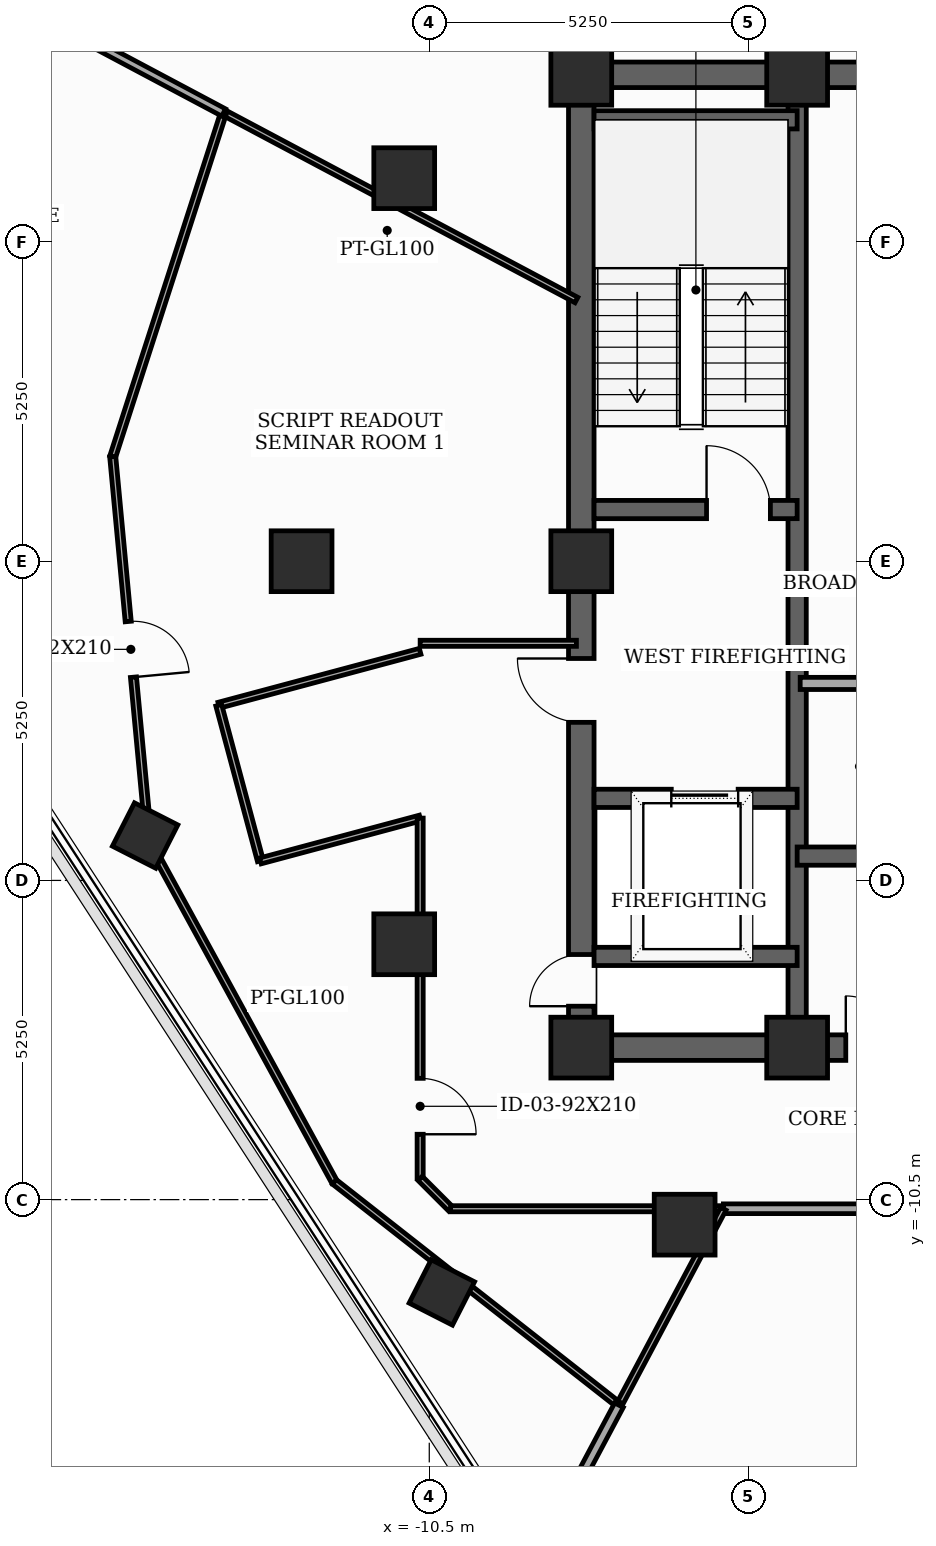
"""IFC4 building model, lengths in metres.
Left out: names, types, materials, properties, quantities, classifications, styles, units other than length and angle.
Written with IfcOpenShell. Run it as: python <this file> out.ifc"""

import sys

from ifc_helpers import new_model, si_unit, direction, frame, frame_2d, origin, origin_2d, place, context, subcontext, project, spatial, rectangle, extrude, element, fill, save


model = new_model("IFC4")
c1 = context("Model", 3, precision=1e-05, world=origin(), true_north=direction((0.0, 1.0)))
c2 = subcontext(c1, "Body", "Model", "MODEL_VIEW")
j1 = project(units=[si_unit("LENGTHUNIT", "METRE"), si_unit("PLANEANGLEUNIT", "RADIAN")], contexts=[c1])
p1 = place(None, origin())
s1 = spatial("IfcSite", under=j1, at=p1, CompositionType="ELEMENT")
p2 = place(p1, origin())
s2 = spatial("IfcBuilding", under=s1, at=p2, CompositionType="ELEMENT")
p3 = place(p2, frame((0.0, 0.0, 270.7)))
s3 = spatial("IfcBuildingStorey", under=s2, at=p3, CompositionType="ELEMENT", Elevation=270.7)
for number, where, z_axis, x_axis in (
    (1, (-8.0, -8.0, 0.0), (0.0, 0.0, 1.0), (1.0, 0.0, 0.0)),
    (2, (-4.45, -8.0, 0.0), (0.0, 0.0, 1.0), (1.0, 0.0, 0.0)),
    (3, (-4.45, 8.0, 0.0), (0.0, 0.0, 1.0), (1.0, 0.0, 0.0)),
    (4, (-8.0, 8.0, 0.0), (0.0, 0.0, 1.0), (1.0, 0.0, 0.0)),
    (5, (-8.0, 0.0, 0.0), (0.0, 0.0, 1.0), (1.0, 0.0, 0.0)),
    (6, (-10.912, 6.3, 0.0), (0.0, 0.0, 1.0), (1.0, 0.0, 0.0)),
    (7, (-12.6, 0.0, 0.0), (0.0, 0.0, 1.0), (1.0, 0.0, 0.0)),
    (8, (-10.912, -6.3, 0.0), (0.0, 0.0, 1.0), (1.0, 0.0, 0.0)),
    (9, (-6.3, -10.912, 0.0), (0.0, 0.0, 1.0), (1.0, 0.0, 0.0)),
):
    element("IfcColumn", number, at=place(p3, frame(where, z_axis=z_axis, x_axis=x_axis)), inside=s3, PredefinedType="COLUMN", context=c2, shape_type="SweptSolid", body=[
        extrude(rectangle(XDim=1.0, YDim=1.0, at=origin_2d()), origin(), (0.0, 0.0, 1.0), 3.7),
    ])
for number, where, z_axis, x_axis in (
    (10, (-15.173, -4.512, 0.0), (0.0, 0.0, 1.0), (0.454, 0.891, 0.0)),
    (11, (-10.293, -12.026, 0.0), (0.0, 0.0, 1.0), (0.454, 0.891, 0.0)),
):
    element("IfcColumn", number, at=place(p3, frame(where, z_axis=z_axis, x_axis=x_axis)), inside=s3, PredefinedType="COLUMN", context=c2, shape_type="SweptSolid", body=[
        extrude(rectangle(XDim=0.8, YDim=0.8, at=origin_2d()), origin(), (0.0, 0.0, 1.0), 3.7),
    ])
p4 = place(p3, frame((-8.0, -8.0, 0.0), z_axis=(0.0, 0.0, 1.0), x_axis=(0.0, 1.0, 0.0)))
e12 = element("IfcWall", 12, at=p4, inside=s3, PredefinedType="SHEAR", context=c2, shape_type="SweptSolid", body=[
    extrude(rectangle(XDim=16.0, YDim=0.42, at=frame_2d((8.0, 0.0))), origin(), (0.0, 0.0, 1.0), 3.5),
])
p5 = place(p4, frame((0.681, 0.0, 0.0)))
e13 = element("IfcOpeningElement", 13, at=p5, cuts=e12, PredefinedType="OPENING", context=c2, shape_type="SweptSolid", body=[
    extrude(rectangle(XDim=0.85, YDim=2.02, at=frame_2d((0.425, 1.01))), frame((0.0, 0.22, 0.0), z_axis=(0.0, -1.0, 0.0), x_axis=(1.0, 0.0, 0.0)), (0.0, 0.0, 1.0), 0.44),
])
p6 = place(p4, frame((5.35, 0.0, 0.0)))
e14 = element("IfcOpeningElement", 14, at=p6, cuts=e12, PredefinedType="OPENING", context=c2, shape_type="SweptSolid", body=[
    extrude(rectangle(XDim=1.05, YDim=2.15, at=frame_2d((0.525, 1.075))), frame((0.0, 0.22, 0.0), z_axis=(0.0, -1.0, 0.0), x_axis=(1.0, 0.0, 0.0)), (0.0, 0.0, 1.0), 0.44),
])
p7 = place(p3, frame((-8.0, -8.0, 0.0), z_axis=(0.0, 0.0, 1.0), x_axis=(1.0, 0.0, 0.0)))
e15 = element("IfcWall", 15, at=p7, inside=s3, PredefinedType="SHEAR", context=c2, shape_type="SweptSolid", body=[
    extrude(rectangle(XDim=16.0, YDim=0.42, at=frame_2d((8.0, 0.0))), origin(), (0.0, 0.0, 1.0), 3.5),
])
p8 = place(p7, frame((4.35, 0.0, 0.0)))
e16 = element("IfcOpeningElement", 16, at=p8, cuts=e15, PredefinedType="OPENING", context=c2, shape_type="SweptSolid", body=[
    extrude(rectangle(XDim=0.85, YDim=2.02, at=frame_2d((0.425, 1.01))), frame((0.0, 0.22, 0.0), z_axis=(0.0, -1.0, 0.0), x_axis=(1.0, 0.0, 0.0)), (0.0, 0.0, 1.0), 0.44),
])
p9 = place(p7, frame((6.49, 0.0, 0.0)))
e17 = element("IfcOpeningElement", 17, at=p9, cuts=e15, PredefinedType="OPENING", context=c2, shape_type="SweptSolid", body=[
    extrude(rectangle(XDim=0.85, YDim=2.02, at=frame_2d((0.425, 1.01))), frame((0.0, 0.22, 0.0), z_axis=(0.0, -1.0, 0.0), x_axis=(1.0, 0.0, 0.0)), (0.0, 0.0, 1.0), 0.44),
])
p10 = place(p7, frame((8.69, 0.0, 0.0)))
e18 = element("IfcOpeningElement", 18, at=p10, cuts=e15, PredefinedType="OPENING", context=c2, shape_type="SweptSolid", body=[
    extrude(rectangle(XDim=0.85, YDim=2.02, at=frame_2d((0.425, 1.01))), frame((0.0, 0.22, 0.0), z_axis=(0.0, -1.0, 0.0), x_axis=(1.0, 0.0, 0.0)), (0.0, 0.0, 1.0), 0.44),
])
p11 = place(p7, frame((10.8, 0.0, 0.0)))
e19 = element("IfcOpeningElement", 19, at=p11, cuts=e15, PredefinedType="OPENING", context=c2, shape_type="SweptSolid", body=[
    extrude(rectangle(XDim=0.85, YDim=2.02, at=frame_2d((0.425, 1.01))), frame((0.0, 0.22, 0.0), z_axis=(0.0, -1.0, 0.0), x_axis=(1.0, 0.0, 0.0)), (0.0, 0.0, 1.0), 0.44),
])
p12 = place(p3, frame((-8.0, 8.0, 0.0), z_axis=(0.0, 0.0, 1.0), x_axis=(1.0, 0.0, 0.0)))
e20 = element("IfcWall", 20, at=p12, inside=s3, PredefinedType="SHEAR", context=c2, shape_type="SweptSolid", body=[
    extrude(rectangle(XDim=16.0, YDim=0.42, at=frame_2d((8.0, 0.0))), origin(), (0.0, 0.0, 1.0), 3.5),
])
p13 = place(p12, frame((7.1, 0.0, 0.0)))
e21 = element("IfcOpeningElement", 21, at=p13, cuts=e20, PredefinedType="OPENING", context=c2, shape_type="SweptSolid", body=[
    extrude(rectangle(XDim=1.8, YDim=2.15, at=frame_2d((0.9, 1.075))), frame((0.0, 0.22, 0.0), z_axis=(0.0, -1.0, 0.0), x_axis=(1.0, 0.0, 0.0)), (0.0, 0.0, 1.0), 0.44),
])
p14 = place(p3, frame((-4.45, -7.79, 0.0), z_axis=(0.0, 0.0, 1.0), x_axis=(0.0, 1.0, 0.0)))
e22 = element("IfcWall", 22, at=p14, inside=s3, PredefinedType="SHEAR", context=c2, shape_type="SweptSolid", body=[
    extrude(rectangle(XDim=15.58, YDim=0.3, at=frame_2d((7.79, 0.0))), origin(), (0.0, 0.0, 1.0), 3.5),
])
p15 = place(p3, frame((-7.79, 0.85, 0.0), z_axis=(0.0, 0.0, 1.0), x_axis=(1.0, 0.0, 0.0)))
e23 = element("IfcWall", 23, at=p15, inside=s3, PredefinedType="SHEAR", context=c2, shape_type="SweptSolid", body=[
    extrude(rectangle(XDim=3.34, YDim=0.3, at=frame_2d((1.67, 0.0))), origin(), (0.0, 0.0, 1.0), 3.5),
])
p16 = place(p15, frame((1.85, 0.0, 0.0)))
e24 = element("IfcOpeningElement", 24, at=p16, cuts=e23, PredefinedType="OPENING", context=c2, shape_type="SweptSolid", body=[
    extrude(rectangle(XDim=1.05, YDim=2.15, at=frame_2d((0.525, 1.075))), frame((0.0, 0.16, 0.0), z_axis=(0.0, -1.0, 0.0), x_axis=(1.0, 0.0, 0.0)), (0.0, 0.0, 1.0), 0.32),
])
p17 = place(p3, frame((-7.79, 7.26, 0.0), z_axis=(0.0, 0.0, 1.0), x_axis=(1.0, 0.0, 0.0)))
e25 = element("IfcWall", 25, at=p17, inside=s3, PredefinedType="SHEAR", context=c2, shape_type="SweptSolid", body=[
    extrude(rectangle(XDim=3.34, YDim=0.3, at=frame_2d((1.67, 0.0))), origin(), (0.0, 0.0, 1.0), 3.5),
])
p18 = place(p3, frame((-7.79, -3.9, 0.0), z_axis=(0.0, 0.0, 1.0), x_axis=(1.0, 0.0, 0.0)))
e26 = element("IfcWall", 26, at=p18, inside=s3, PredefinedType="SHEAR", context=c2, shape_type="SweptSolid", body=[
    extrude(rectangle(XDim=3.34, YDim=0.3, at=frame_2d((1.67, 0.0))), origin(), (0.0, 0.0, 1.0), 3.5),
])
p19 = place(p18, frame((1.27, 0.0, 0.0)))
e27 = element("IfcOpeningElement", 27, at=p19, cuts=e26, PredefinedType="OPENING", context=c2, shape_type="SweptSolid", body=[
    extrude(rectangle(XDim=1.1, YDim=2.1, at=frame_2d((0.55, 1.05))), frame((0.0, 0.16, 0.0), z_axis=(0.0, -1.0, 0.0), x_axis=(1.0, 0.0, 0.0)), (0.0, 0.0, 1.0), 0.32),
])
p20 = place(p3, frame((-7.79, -6.5, 0.0), z_axis=(0.0, 0.0, 1.0), x_axis=(1.0, 0.0, 0.0)))
e28 = element("IfcWall", 28, at=p20, inside=s3, PredefinedType="SHEAR", context=c2, shape_type="SweptSolid", body=[
    extrude(rectangle(XDim=3.34, YDim=0.3, at=frame_2d((1.67, 0.0))), origin(), (0.0, 0.0, 1.0), 3.5),
])
p21 = place(p3, frame((-4.45, -4.85, 0.0), z_axis=(0.0, 0.0, 1.0), x_axis=(1.0, 0.0, 0.0)))
e29 = element("IfcWall", 29, at=p21, inside=s3, PredefinedType="SHEAR", context=c2, shape_type="SweptSolid", body=[
    extrude(rectangle(XDim=8.9, YDim=0.3, at=frame_2d((4.45, 0.0))), origin(), (0.0, 0.0, 1.0), 3.5),
])
p22 = place(p3, frame((-4.4, -2.01, 0.0), z_axis=(0.0, 0.0, 1.0), x_axis=(1.0, 0.0, 0.0)))
e30 = element("IfcWall", 30, at=p22, inside=s3, PredefinedType="SOLIDWALL", context=c2, shape_type="SweptSolid", body=[
    extrude(rectangle(XDim=2.68, YDim=0.2, at=frame_2d((1.34, 0.0))), origin(), (0.0, 0.0, 1.0), 3.5),
])
p23 = place(p3, frame((-8.08, -1.35, 0.0), z_axis=(0.0, 0.0, 1.0), x_axis=(-1.0, 0.0, 0.0)))
e31 = element("IfcWall", 31, at=p23, inside=s3, PredefinedType="MOVABLE", context=c2, shape_type="SweptSolid", body=[
    extrude(rectangle(XDim=2.57, YDim=0.1, at=frame_2d((1.285, 0.0))), origin(), (0.0, 0.0, 1.0), 2.885),
])
p24 = place(p3, frame((-10.65, -1.482, 0.0), z_axis=(0.0, 0.0, 1.0), x_axis=(-0.965961397105, -0.2586862565, 0.0)))
e32 = element("IfcWall", 32, at=p24, inside=s3, PredefinedType="MOVABLE", context=c2, shape_type="SweptSolid", body=[
    extrude(rectangle(XDim=3.429, YDim=0.1, at=frame_2d((1.714, 0.0))), origin(), (0.0, 0.0, 1.0), 2.885),
])
p25 = place(p3, frame((-13.962, -2.369, 0.0), z_axis=(0.0, 0.0, 1.0), x_axis=(0.258413725385, -0.966034340245, 0.0)))
e33 = element("IfcWall", 33, at=p25, inside=s3, PredefinedType="MOVABLE", context=c2, shape_type="SweptSolid", body=[
    extrude(rectangle(XDim=2.65, YDim=0.1, at=frame_2d((1.325, 0.0))), origin(), (0.0, 0.0, 1.0), 3.5),
])
p26 = place(p3, frame((-13.277, -4.929, 0.0), z_axis=(0.0, 0.0, 1.0), x_axis=(0.965934830229, 0.258785439601, 0.0)))
e34 = element("IfcWall", 34, at=p26, inside=s3, PredefinedType="MOVABLE", context=c2, shape_type="SweptSolid", body=[
    extrude(rectangle(XDim=2.72, YDim=0.1, at=frame_2d((1.36, 0.0))), origin(), (0.0, 0.0, 1.0), 2.885),
])
p27 = place(p3, frame((-10.65, -4.225, 0.0), z_axis=(0.0, 0.0, 1.0), x_axis=(0.0, -1.0, 0.0)))
e35 = element("IfcWall", 35, at=p27, inside=s3, PredefinedType="MOVABLE", context=c2, shape_type="SweptSolid", body=[
    extrude(rectangle(XDim=5.925, YDim=0.1, at=frame_2d((2.962, 0.0))), origin(), (0.0, 0.0, 1.0), 2.885),
])
p28 = place(p27, frame((4.28, 0.0, 0.0)))
e36 = element("IfcOpeningElement", 36, at=p28, cuts=e35, PredefinedType="OPENING", context=c2, shape_type="SweptSolid", body=[
    extrude(rectangle(XDim=0.92, YDim=2.1, at=frame_2d((0.46, 1.05))), frame((0.0, 0.06, 0.0), z_axis=(0.0, -1.0, 0.0), x_axis=(1.0, 0.0, 0.0)), (0.0, 0.0, 1.0), 0.12),
])
p29 = place(p3, frame((-10.65, -10.15, 0.0), z_axis=(0.0, 0.0, 1.0), x_axis=(0.707106781187, -0.707106781187, 0.0)))
e37 = element("IfcWall", 37, at=p29, inside=s3, PredefinedType="MOVABLE", context=c2, shape_type="SweptSolid", body=[
    extrude(rectangle(XDim=0.707, YDim=0.1, at=frame_2d((0.354, 0.0))), origin(), (0.0, 0.0, 1.0), 3.5),
])
p30 = place(p3, frame((-10.15, -10.65, 0.0), z_axis=(0.0, 0.0, 1.0), x_axis=(1.0, 0.0, 0.0)))
e38 = element("IfcWall", 38, at=p30, inside=s3, PredefinedType="MOVABLE", context=c2, shape_type="SweptSolid", body=[
    extrude(rectangle(XDim=4.487, YDim=0.1, at=frame_2d((2.243, 0.0))), origin(), (0.0, 0.0, 1.0), 2.885),
])
p31 = place(p3, frame((-5.663, -10.65, 0.0), z_axis=(0.0, 0.0, 1.0), x_axis=(1.0, 0.0, 0.0)))
e39 = element("IfcWall", 39, at=p31, inside=s3, PredefinedType="PARTITIONING", context=c2, shape_type="SweptSolid", body=[
    extrude(rectangle(XDim=7.541, YDim=0.16, at=frame_2d((3.771, 0.0))), origin(), (0.0, 0.0, 1.0), 2.885),
])
p32 = place(p31, frame((3.271, 0.0, 0.0)))
e40 = element("IfcOpeningElement", 40, at=p32, cuts=e39, PredefinedType="OPENING", context=c2, shape_type="SweptSolid", body=[
    extrude(rectangle(XDim=1.0, YDim=2.15, at=frame_2d((0.5, 1.075))), frame((0.0, 0.09, 0.0), z_axis=(0.0, -1.0, 0.0), x_axis=(1.0, 0.0, 0.0)), (0.0, 0.0, 1.0), 0.18),
])
p33 = place(p3, frame((-7.38, -13.881, 0.0), z_axis=(0.0, 0.0, 1.0), x_axis=(0.469202384294, 0.883090664979, 0.0)))
e41 = element("IfcWall", 41, at=p33, inside=s3, PredefinedType="MOVABLE", context=c2, shape_type="SweptSolid", body=[
    extrude(rectangle(XDim=3.659, YDim=0.1, at=frame_2d((1.83, 0.0))), origin(), (0.0, 0.0, 1.0), 2.885),
])
p34 = place(p3, frame((-8.08, 4.296, 0.0), z_axis=(0.0, 0.0, 1.0), x_axis=(-0.882977594756, 0.469415133074, 0.0)))
e42 = element("IfcWall", 42, at=p34, inside=s3, PredefinedType="MOVABLE", context=c2, shape_type="SweptSolid", body=[
    extrude(rectangle(XDim=6.57, YDim=0.1, at=frame_2d((3.285, 0.0))), origin(), (0.0, 0.0, 1.0), 2.885),
])
p35 = place(p3, frame((-13.881, 7.38, 0.0), z_axis=(0.0, 0.0, 1.0), x_axis=(-0.306876830036, -0.951749237555, 0.0)))
e43 = element("IfcWall", 43, at=p35, inside=s3, PredefinedType="MOVABLE", context=c2, shape_type="SweptSolid", body=[
    extrude(rectangle(XDim=5.947, YDim=0.1, at=frame_2d((2.973, 0.0))), origin(), (0.0, 0.0, 1.0), 3.185),
])
p36 = place(p3, frame((-15.706, 1.72, 0.0), z_axis=(0.0, 0.0, 1.0), x_axis=(0.093602035829, -0.995609692042, 0.0)))
e44 = element("IfcWall", 44, at=p36, inside=s3, PredefinedType="MOVABLE", context=c2, shape_type="SweptSolid", body=[
    extrude(rectangle(XDim=6.367, YDim=0.1, at=frame_2d((3.183, 0.0))), origin(), (0.0, 0.0, 1.0), 3.035),
])
p37 = place(p36, frame((2.723, 0.0, 0.0)))
e45 = element("IfcOpeningElement", 45, at=p37, cuts=e44, PredefinedType="OPENING", context=c2, shape_type="SweptSolid", body=[
    extrude(rectangle(XDim=0.92, YDim=2.1, at=frame_2d((0.46, 1.05))), frame((0.0, 0.06, 0.0), z_axis=(0.0, -1.0, 0.0), x_axis=(1.0, 0.0, 0.0)), (0.0, 0.0, 1.0), 0.12),
])
p38 = place(p3, frame((-15.11, -4.619, 0.0), z_axis=(0.0, 0.0, 1.0), x_axis=(0.47908041906, -0.877771013461, 0.0)))
e46 = element("IfcWall", 46, at=p38, inside=s3, PredefinedType="MOVABLE", context=c2, shape_type="SweptSolid", body=[
    extrude(rectangle(XDim=6.368, YDim=0.1, at=frame_2d((3.184, 0.0))), origin(), (0.0, 0.0, 1.0), 3.035),
])
p39 = place(p3, frame((-12.059, -10.209, 0.0), z_axis=(0.0, 0.0, 1.0), x_axis=(0.786677127243, -0.617364638989, 0.0)))
e47 = element("IfcWall", 47, at=p39, inside=s3, PredefinedType="MOVABLE", context=c2, shape_type="SweptSolid", body=[
    extrude(rectangle(XDim=5.948, YDim=0.1, at=frame_2d((2.974, 0.0))), origin(), (0.0, 0.0, 1.0), 3.035),
])
p40 = place(p3, frame((-7.38, -13.881, 0.0), z_axis=(0.0, 0.0, 1.0), x_axis=(-0.469646984778, -0.882854296976, 0.0)))
e48 = element("IfcWall", 48, at=p40, inside=s3, PredefinedType="PARTITIONING", context=c2, shape_type="SweptSolid", body=[
    extrude(rectangle(XDim=2.976, YDim=0.16, at=frame_2d((1.488, 0.0))), origin(), (0.0, 0.0, 1.0), 3.035),
])
p41 = place(p3, frame((-25.738, 13.685, 0.0), z_axis=(0.0, 0.0, 1.0), x_axis=(0.882921457353, -0.469520713222, 0.0)))
e49 = element("IfcWall", 49, at=p41, inside=s3, PredefinedType="PARTITIONING", context=c2, shape_type="SweptSolid", body=[
    extrude(rectangle(XDim=13.429, YDim=0.135, at=frame_2d((6.715, 0.0))), origin(), (0.0, 0.0, 1.0), 3.035),
])
p42 = place(p5, origin())
e50 = element("IfcDoor", 50, at=p42, inside=s3, OperationType="SINGLE_SWING_LEFT", PredefinedType="TRAPDOOR", context=c2, shape_type="SweptSolid", body=[
    extrude(rectangle(XDim=0.85, YDim=2.02, at=frame_2d((0.425, 1.01))), frame((0.0, 0.025, 0.0), z_axis=(0.0, -1.0, 0.0), x_axis=(1.0, 0.0, 0.0)), (0.0, 0.0, 1.0), 0.05),
])
fill(e13, e50)
p43 = place(p6, origin())
e51 = element("IfcDoor", 51, at=p43, inside=s3, OperationType="SINGLE_SWING_RIGHT", PredefinedType="DOOR", context=c2, shape_type="SweptSolid", body=[
    extrude(rectangle(XDim=1.05, YDim=2.15, at=frame_2d((0.525, 1.075))), frame((0.0, 0.025, 0.0), z_axis=(0.0, -1.0, 0.0), x_axis=(1.0, 0.0, 0.0)), (0.0, 0.0, 1.0), 0.05),
])
fill(e14, e51)
p44 = place(p8, origin())
e52 = element("IfcDoor", 52, at=p44, inside=s3, OperationType="SINGLE_SWING_LEFT", PredefinedType="TRAPDOOR", context=c2, shape_type="SweptSolid", body=[
    extrude(rectangle(XDim=0.85, YDim=2.02, at=frame_2d((0.425, 1.01))), frame((0.0, 0.025, 0.0), z_axis=(0.0, -1.0, 0.0), x_axis=(1.0, 0.0, 0.0)), (0.0, 0.0, 1.0), 0.05),
])
fill(e16, e52)
p45 = place(p16, origin())
e53 = element("IfcDoor", 53, at=p45, inside=s3, OperationType="SINGLE_SWING_LEFT", PredefinedType="DOOR", context=c2, shape_type="SweptSolid", body=[
    extrude(rectangle(XDim=1.05, YDim=2.15, at=frame_2d((0.525, 1.075))), frame((0.0, 0.025, 0.0), z_axis=(0.0, -1.0, 0.0), x_axis=(1.0, 0.0, 0.0)), (0.0, 0.0, 1.0), 0.05),
])
fill(e24, e53)
p46 = place(p19, origin())
e54 = element("IfcDoor", 54, at=p46, inside=s3, OperationType="SLIDING_TO_LEFT", PredefinedType="DOOR", context=c2, shape_type="SweptSolid", body=[
    extrude(rectangle(XDim=1.1, YDim=2.1, at=frame_2d((0.55, 1.05))), frame((0.0, 0.025, 0.0), z_axis=(0.0, -1.0, 0.0), x_axis=(1.0, 0.0, 0.0)), (0.0, 0.0, 1.0), 0.05),
])
fill(e27, e54)
p47 = place(p28, origin())
e55 = element("IfcDoor", 55, at=p47, inside=s3, OperationType="SINGLE_SWING_RIGHT", PredefinedType="DOOR", context=c2, shape_type="SweptSolid", body=[
    extrude(rectangle(XDim=0.92, YDim=2.1, at=frame_2d((0.46, 1.05))), frame((0.0, 0.025, 0.0), z_axis=(0.0, -1.0, 0.0), x_axis=(1.0, 0.0, 0.0)), (0.0, 0.0, 1.0), 0.05),
])
fill(e36, e55)
p48 = place(p37, origin())
e56 = element("IfcDoor", 56, at=p48, inside=s3, OperationType="SINGLE_SWING_RIGHT", PredefinedType="DOOR", context=c2, shape_type="SweptSolid", body=[
    extrude(rectangle(XDim=0.92, YDim=2.1, at=frame_2d((0.46, 1.05))), frame((0.0, 0.025, 0.0), z_axis=(0.0, -1.0, 0.0), x_axis=(1.0, 0.0, 0.0)), (0.0, 0.0, 1.0), 0.05),
])
fill(e45, e56)
save(model, sys.argv[1])
